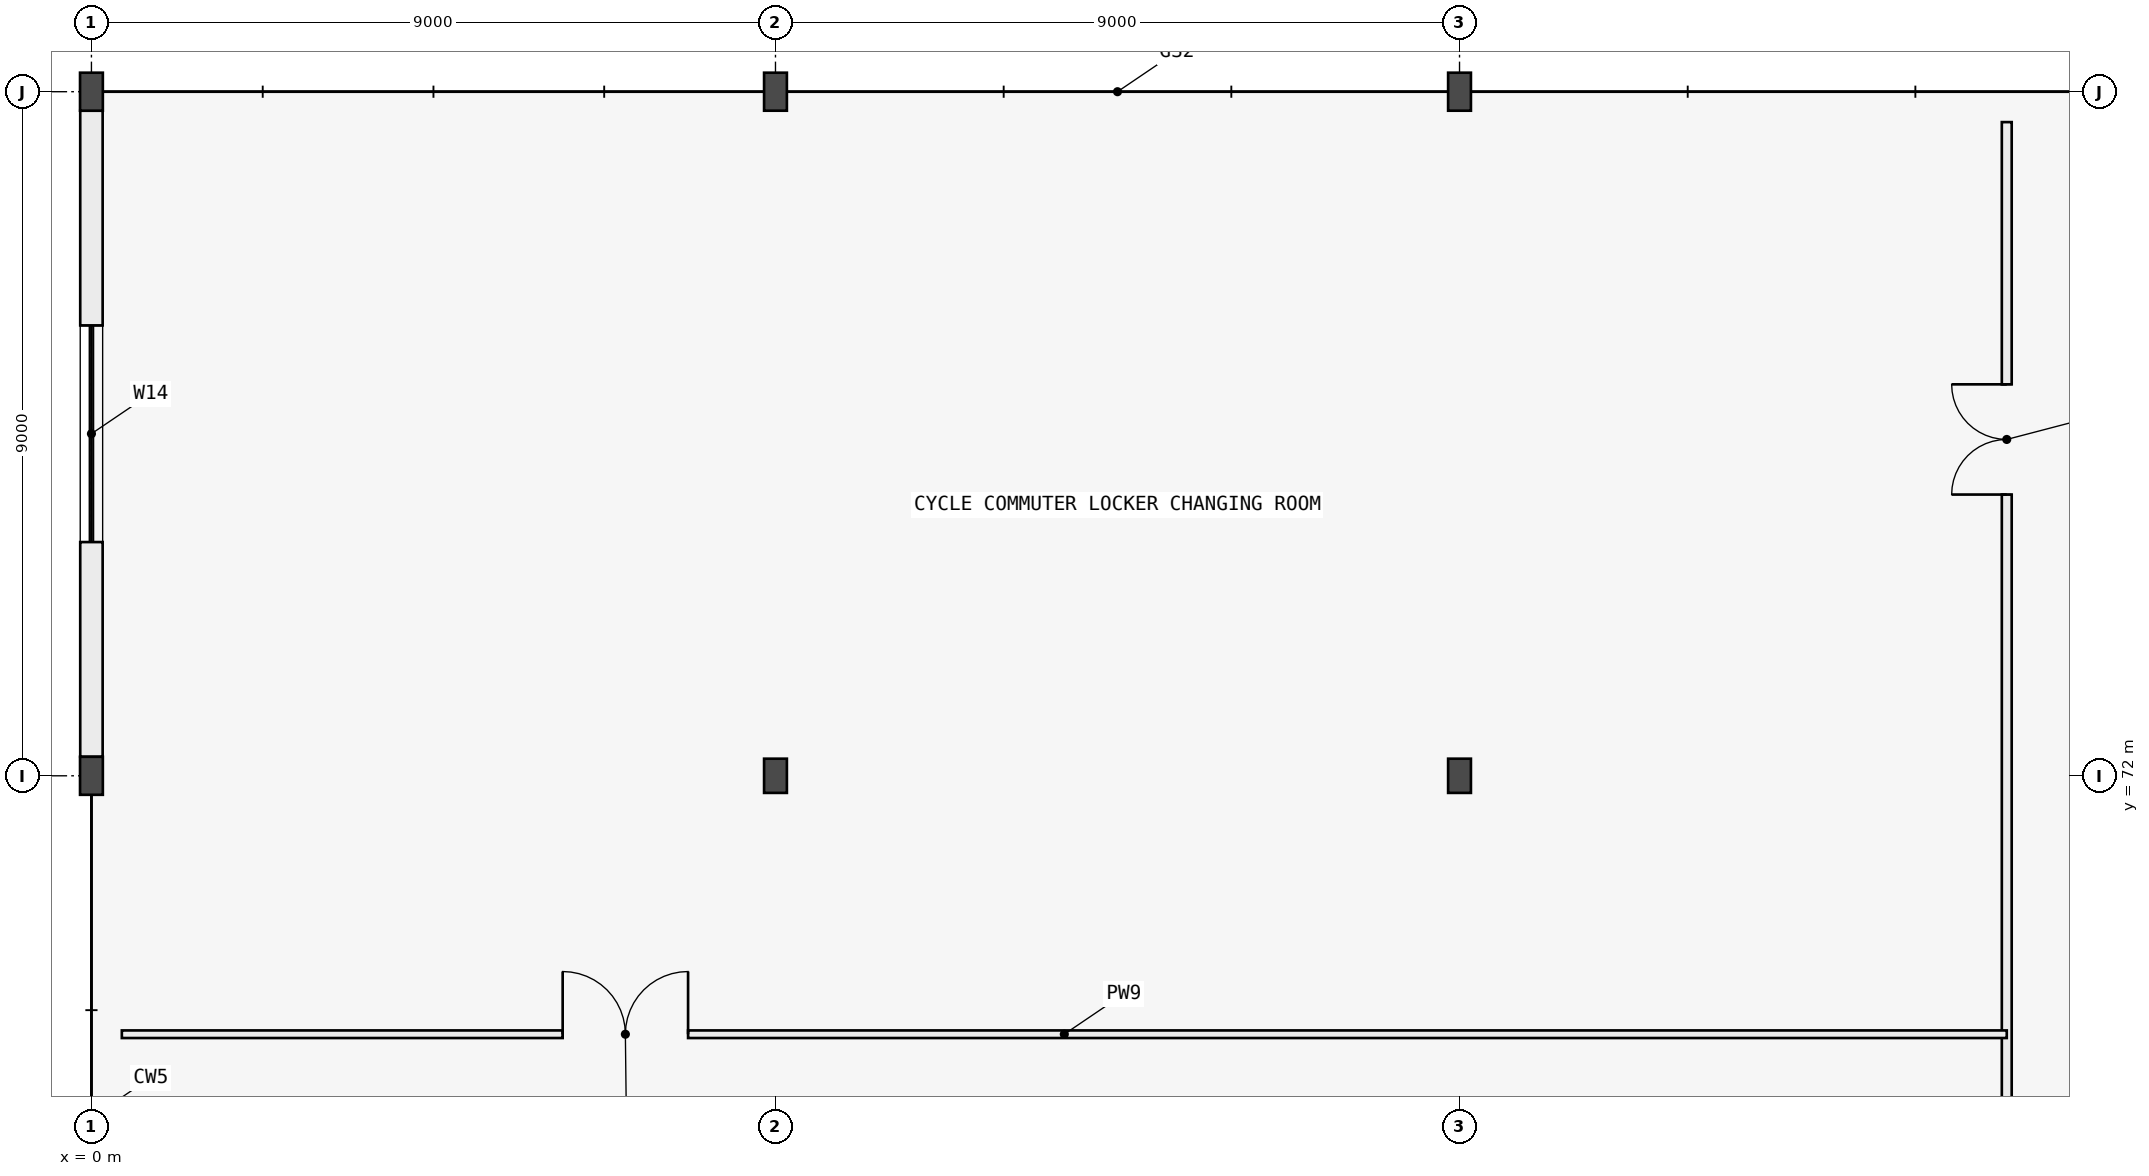
"""IFC4 building model, lengths in metres.
Left out: names, types, materials, properties, quantities, classifications, styles, units other than length and angle.
Written with IfcOpenShell. Run it as: python <this file> out.ifc"""

import sys

from ifc_helpers import new_model, si_unit, direction, frame, frame_2d, origin, origin_2d, place, context, subcontext, project, spatial, rectangle, i_section, extrude, element, fill, save


model = new_model("IFC4")
c1 = context("Model", 3, precision=1e-05, world=origin(), true_north=direction((0.0, 1.0)))
c2 = subcontext(c1, "Body", "Model", "MODEL_VIEW")
j1 = project(units=[si_unit("LENGTHUNIT", "METRE"), si_unit("PLANEANGLEUNIT", "RADIAN")], contexts=[c1])
p1 = place(None, origin())
s1 = spatial("IfcSite", under=j1, at=p1, CompositionType="ELEMENT")
p2 = place(p1, origin())
s2 = spatial("IfcBuilding", under=s1, at=p2, CompositionType="ELEMENT")
p3 = place(p2, frame((0.0, 0.0, 8.4)))
s3 = spatial("IfcBuildingStorey", under=s2, at=p3, CompositionType="ELEMENT", Elevation=8.4)
p4 = place(p3, frame((0.0, 72.0, 0.0), z_axis=(0.0, 0.0, 1.0), x_axis=(1.0, 0.0, 0.0)))
e1 = element("IfcColumn", 1, at=p4, inside=s3, PredefinedType="COLUMN", context=c2, shape_type="SweptSolid", body=[
    extrude(i_section(OverallWidth=0.3, OverallDepth=0.5, WebThickness=0.014, FlangeThickness=0.028, FilletRadius=0.027, at=origin_2d()), origin(), (0.0, 0.0, 1.0), 4.2),
])
for number, where, z_axis, x_axis in (
    (2, (9.0, 72.0, 0.0), (0.0, 0.0, 1.0), (1.0, 0.0, 0.0)),
    (3, (18.0, 72.0, 0.0), (0.0, 0.0, 1.0), (1.0, 0.0, 0.0)),
):
    element("IfcColumn", number, at=place(p3, frame(where, z_axis=z_axis, x_axis=x_axis)), inside=s3, PredefinedType="COLUMN", context=c2, shape_type="SweptSolid", body=[
        extrude(i_section(OverallWidth=0.3, OverallDepth=0.45, WebThickness=0.014, FlangeThickness=0.026, FilletRadius=0.027, at=origin_2d()), origin(), (0.0, 0.0, 1.0), 4.2),
    ])
for number, where, z_axis, x_axis in (
    (4, (0.0, 81.0, 0.0), (0.0, 0.0, 1.0), (1.0, 0.0, 0.0)),
    (5, (9.0, 81.0, 0.0), (0.0, 0.0, 1.0), (1.0, 0.0, 0.0)),
    (6, (18.0, 81.0, 0.0), (0.0, 0.0, 1.0), (1.0, 0.0, 0.0)),
):
    element("IfcColumn", number, at=place(p3, frame(where, z_axis=z_axis, x_axis=x_axis)), inside=s3, PredefinedType="COLUMN", context=c2, shape_type="SweptSolid", body=[
        extrude(i_section(OverallWidth=0.3, OverallDepth=0.5, WebThickness=0.014, FlangeThickness=0.028, FilletRadius=0.027, at=origin_2d()), origin(), (0.0, 0.0, 1.0), 4.2),
    ])
p5 = place(p3, frame((0.0, 72.25, 0.0), z_axis=(0.0, 0.0, 1.0), x_axis=(0.0, 1.0, 0.0)))
e7 = element("IfcWall", 7, at=p5, inside=s3, PredefinedType="STANDARD", context=c2, shape_type="SweptSolid", body=[
    extrude(rectangle(XDim=8.5, YDim=0.295, at=frame_2d((4.25, 0.0))), origin(), (0.0, 0.0, 1.0), 3.935),
])
p6 = place(p5, frame((2.825, 0.0, 0.95)))
e8 = element("IfcOpeningElement", 8, at=p6, cuts=e7, PredefinedType="OPENING", context=c2, shape_type="SweptSolid", body=[
    extrude(rectangle(XDim=2.85, YDim=1.7, at=frame_2d((1.425, 0.85))), frame((0.0, 0.157, 0.0), z_axis=(0.0, -1.0, 0.0), x_axis=(1.0, 0.0, 0.0)), (0.0, 0.0, 1.0), 0.315),
])
p7 = place(p3, frame((25.2, 51.2, 0.0), z_axis=(0.0, 0.0, 1.0), x_axis=(0.0, 1.0, 0.0)))
e9 = element("IfcWall", 9, at=p7, inside=s3, PredefinedType="PARTITIONING", context=c2, shape_type="SweptSolid", body=[
    extrude(rectangle(XDim=29.4, YDim=0.13, at=frame_2d((14.7, 0.0))), origin(), (0.0, 0.0, 1.0), 3.935),
])
p8 = place(p7, frame((5.2, 0.0, 0.0)))
e10 = element("IfcOpeningElement", 10, at=p8, cuts=e9, PredefinedType="OPENING", context=c2, shape_type="SweptSolid", body=[
    extrude(rectangle(XDim=1.32, YDim=2.2, at=frame_2d((0.66, 1.1))), frame((0.0, 0.075, 0.0), z_axis=(0.0, -1.0, 0.0), x_axis=(1.0, 0.0, 0.0)), (0.0, 0.0, 1.0), 0.15),
])
p9 = place(p7, frame((24.5, 0.0, 0.0)))
e11 = element("IfcOpeningElement", 11, at=p9, cuts=e9, PredefinedType="OPENING", context=c2, shape_type="SweptSolid", body=[
    extrude(rectangle(XDim=1.45, YDim=2.22, at=frame_2d((0.725, 1.11))), frame((0.0, 0.075, 0.0), z_axis=(0.0, -1.0, 0.0), x_axis=(1.0, 0.0, 0.0)), (0.0, 0.0, 1.0), 0.15),
])
p10 = place(p3, frame((0.4, 68.6, 0.0), z_axis=(0.0, 0.0, 1.0), x_axis=(1.0, 0.0, 0.0)))
e12 = element("IfcWall", 12, at=p10, inside=s3, PredefinedType="PARTITIONING", context=c2, shape_type="SweptSolid", body=[
    extrude(rectangle(XDim=24.8, YDim=0.1, at=frame_2d((12.4, 0.0))), origin(), (0.0, 0.0, 1.0), 3.935),
])
p11 = place(p10, frame((5.8, 0.0, 0.0)))
e13 = element("IfcOpeningElement", 13, at=p11, cuts=e12, PredefinedType="OPENING", context=c2, shape_type="SweptSolid", body=[
    extrude(rectangle(XDim=1.65, YDim=2.25, at=frame_2d((0.825, 1.125))), frame((0.0, 0.06, 0.0), z_axis=(0.0, -1.0, 0.0), x_axis=(1.0, 0.0, 0.0)), (0.0, 0.0, 1.0), 0.12),
])
p12 = place(p6, origin())
e14 = element("IfcWindow", 14, at=p12, inside=s3, PartitioningType="SINGLE_PANEL", PredefinedType="WINDOW", context=c2, shape_type="SweptSolid", body=[
    extrude(rectangle(XDim=2.85, YDim=1.7, at=frame_2d((1.425, 0.85))), frame((0.0, 0.03, 0.0), z_axis=(0.0, -1.0, 0.0), x_axis=(1.0, 0.0, 0.0)), (0.0, 0.0, 1.0), 0.06),
])
fill(e8, e14)
p13 = place(p9, origin())
e15 = element("IfcDoor", 15, at=p13, inside=s3, OperationType="DOUBLE_DOOR_SINGLE_SWING", PredefinedType="DOOR", context=c2, shape_type="SweptSolid", body=[
    extrude(rectangle(XDim=1.45, YDim=2.22, at=frame_2d((0.725, 1.11))), frame((0.0, 0.025, 0.0), z_axis=(0.0, -1.0, 0.0), x_axis=(1.0, 0.0, 0.0)), (0.0, 0.0, 1.0), 0.05),
])
fill(e11, e15)
p14 = place(p11, origin())
e16 = element("IfcDoor", 16, at=p14, inside=s3, OperationType="DOUBLE_DOOR_SINGLE_SWING", PredefinedType="DOOR", context=c2, shape_type="SweptSolid", body=[
    extrude(rectangle(XDim=1.65, YDim=2.25, at=frame_2d((0.825, 1.125))), frame((0.0, 0.025, 0.0), z_axis=(0.0, -1.0, 0.0), x_axis=(1.0, 0.0, 0.0)), (0.0, 0.0, 1.0), 0.05),
])
fill(e13, e16)
save(model, sys.argv[1])
